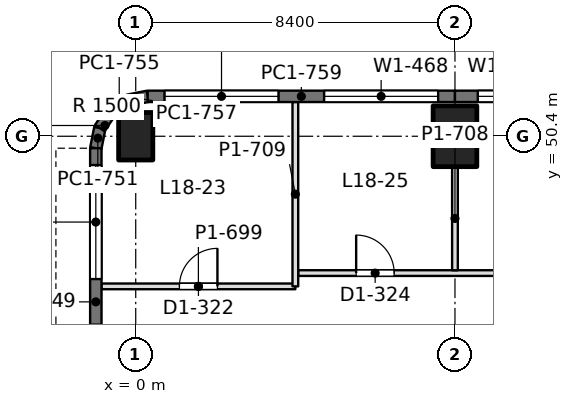
"""IFC4 building model, lengths in metres.
Left out: names, types, materials, properties, quantities, classifications, styles, units other than length and angle.
Written with IfcOpenShell. Run it as: python <this file> out.ifc"""

import sys

from ifc_helpers import new_model, si_unit, direction, frame, frame_2d, origin, origin_2d, place, context, subcontext, project, spatial, rectangle, extrude, element, fill, save


model = new_model("IFC4")
c1 = context("Model", 3, precision=1e-05, world=origin(), true_north=direction((0.0, 1.0)))
c2 = subcontext(c1, "Body", "Model", "MODEL_VIEW")
j1 = project(units=[si_unit("LENGTHUNIT", "METRE"), si_unit("PLANEANGLEUNIT", "RADIAN")], contexts=[c1])
p1 = place(None, origin())
s1 = spatial("IfcSite", under=j1, at=p1, CompositionType="ELEMENT")
p2 = place(p1, origin())
s2 = spatial("IfcBuilding", under=s1, at=p2, CompositionType="ELEMENT")
p3 = place(p2, frame((0.0, 0.0, 81.9)))
s3 = spatial("IfcBuildingStorey", under=s2, at=p3, CompositionType="ELEMENT", Elevation=81.9)
p4 = place(p3, frame((0.0, 50.4, 0.0), z_axis=(0.0, 0.0, 1.0), x_axis=(1.0, 0.0, 0.0)))
e1 = element("IfcColumn", 1, at=p4, inside=s3, PredefinedType="COLUMN", context=c2, shape_type="SweptSolid", body=[
    extrude(rectangle(XDim=0.9, YDim=1.25, at=origin_2d()), origin(), (0.0, 0.0, 1.0), 4.5),
])
p5 = place(p3, frame((8.4, 50.4, 0.0), z_axis=(0.0, 0.0, 1.0), x_axis=(1.0, 0.0, 0.0)))
e2 = element("IfcColumn", 2, at=p5, inside=s3, PredefinedType="COLUMN", context=c2, shape_type="SweptSolid", body=[
    extrude(rectangle(XDim=1.15, YDim=1.6, at=origin_2d()), origin(), (0.0, 0.0, 1.0), 4.5),
])
p6 = place(p3, frame((-1.05, 42.0, 0.0), z_axis=(0.0, 0.0, 1.0), x_axis=(0.0, 1.0, 0.0)))
e3 = element("IfcWall", 3, at=p6, inside=s3, PredefinedType="SOLIDWALL", context=c2, shape_type="SweptSolid", body=[
    extrude(rectangle(XDim=8.085, YDim=0.3, at=frame_2d((4.042, 0.0))), origin(), (0.0, 0.0, 1.0), 4.34),
])
p7 = place(p6, frame((0.443, 0.0, 0.9)))
e4 = element("IfcOpeningElement", 4, at=p7, cuts=e3, PredefinedType="OPENING", context=c2, shape_type="SweptSolid", body=[
    extrude(rectangle(XDim=3.0, YDim=1.9, at=frame_2d((1.5, 0.95))), frame((0.0, 0.16, 0.0), z_axis=(0.0, -1.0, 0.0), x_axis=(1.0, 0.0, 0.0)), (0.0, 0.0, 1.0), 0.32),
])
p8 = place(p6, frame((4.643, 0.0, 0.9)))
e5 = element("IfcOpeningElement", 5, at=p8, cuts=e3, PredefinedType="OPENING", context=c2, shape_type="SweptSolid", body=[
    extrude(rectangle(XDim=3.0, YDim=1.9, at=frame_2d((1.5, 0.95))), frame((0.0, 0.16, 0.0), z_axis=(0.0, -1.0, 0.0), x_axis=(1.0, 0.0, 0.0)), (0.0, 0.0, 1.0), 0.32),
])
p9 = place(p3, frame((-1.05, 50.085, 0.0), z_axis=(0.0, 0.0, 1.0), x_axis=(0.195073962632, 0.980788534345, 0.0)))
e6 = element("IfcWall", 6, at=p9, inside=s3, PredefinedType="SOLIDWALL", context=c2, shape_type="SweptSolid", body=[
    extrude(rectangle(XDim=0.541, YDim=0.3, at=frame_2d((0.271, 0.0))), origin(), (0.0, 0.0, 1.0), 4.34),
])
for number, where, z_axis, x_axis in (
    (7, (-0.945, 50.615, 0.0), (0.0, 0.0, 1.0), (0.556, 0.831, 0.0)),
    (8, (-0.653, 51.052, 0.0), (0.0, 0.0, 1.0), (0.831, 0.556, 0.0)),
):
    element("IfcWall", number, at=place(p3, frame(where, z_axis=z_axis, x_axis=x_axis)), inside=s3, PredefinedType="SOLIDWALL", context=c2, shape_type="SweptSolid", body=[
        extrude(rectangle(XDim=0.526, YDim=0.3, at=frame_2d((0.263, 0.0))), origin(), (0.0, 0.0, 1.0), 4.34),
    ])
p10 = place(p3, frame((-0.216, 51.344, 0.0), z_axis=(0.0, 0.0, 1.0), x_axis=(0.980788534345, 0.195073962632, 0.0)))
e9 = element("IfcWall", 9, at=p10, inside=s3, PredefinedType="SOLIDWALL", context=c2, shape_type="SweptSolid", body=[
    extrude(rectangle(XDim=0.541, YDim=0.3, at=frame_2d((0.271, 0.0))), origin(), (0.0, 0.0, 1.0), 4.34),
])
p11 = place(p3, frame((0.315, 51.45, 0.0), z_axis=(0.0, 0.0, 1.0), x_axis=(1.0, 0.0, 0.0)))
e10 = element("IfcWall", 10, at=p11, inside=s3, PredefinedType="SOLIDWALL", context=c2, shape_type="SweptSolid", body=[
    extrude(rectangle(XDim=8.085, YDim=0.3, at=frame_2d((4.042, 0.0))), origin(), (0.0, 0.0, 1.0), 4.34),
])
p12 = place(p11, frame((0.443, 0.0, 0.9)))
e11 = element("IfcOpeningElement", 11, at=p12, cuts=e10, PredefinedType="OPENING", context=c2, shape_type="SweptSolid", body=[
    extrude(rectangle(XDim=3.0, YDim=1.9, at=frame_2d((1.5, 0.95))), frame((0.0, 0.16, 0.0), z_axis=(0.0, -1.0, 0.0), x_axis=(1.0, 0.0, 0.0)), (0.0, 0.0, 1.0), 0.32),
])
p13 = place(p11, frame((4.643, 0.0, 0.9)))
e12 = element("IfcOpeningElement", 12, at=p13, cuts=e10, PredefinedType="OPENING", context=c2, shape_type="SweptSolid", body=[
    extrude(rectangle(XDim=3.0, YDim=1.9, at=frame_2d((1.5, 0.95))), frame((0.0, 0.16, 0.0), z_axis=(0.0, -1.0, 0.0), x_axis=(1.0, 0.0, 0.0)), (0.0, 0.0, 1.0), 0.32),
])
p14 = place(p3, frame((8.4, 51.45, 0.0), z_axis=(0.0, 0.0, 1.0), x_axis=(1.0, 0.0, 0.0)))
e13 = element("IfcWall", 13, at=p14, inside=s3, PredefinedType="SOLIDWALL", context=c2, shape_type="SweptSolid", body=[
    extrude(rectangle(XDim=8.4, YDim=0.3, at=frame_2d((4.2, 0.0))), origin(), (0.0, 0.0, 1.0), 4.34),
])
p15 = place(p14, frame((0.6, 0.0, 0.9)))
e14 = element("IfcOpeningElement", 14, at=p15, cuts=e13, PredefinedType="OPENING", context=c2, shape_type="SweptSolid", body=[
    extrude(rectangle(XDim=3.0, YDim=1.9, at=frame_2d((1.5, 0.95))), frame((0.0, 0.16, 0.0), z_axis=(0.0, -1.0, 0.0), x_axis=(1.0, 0.0, 0.0)), (0.0, 0.0, 1.0), 0.32),
])
p16 = place(p14, frame((4.8, 0.0, 0.9)))
e15 = element("IfcOpeningElement", 15, at=p16, cuts=e13, PredefinedType="OPENING", context=c2, shape_type="SweptSolid", body=[
    extrude(rectangle(XDim=3.0, YDim=1.9, at=frame_2d((1.5, 0.95))), frame((0.0, 0.16, 0.0), z_axis=(0.0, -1.0, 0.0), x_axis=(1.0, 0.0, 0.0)), (0.0, 0.0, 1.0), 0.32),
])
p17 = place(p3, frame((-0.902, 46.45, 0.0), z_axis=(0.0, 0.0, 1.0), x_axis=(1.0, 0.0, 0.0)))
e16 = element("IfcWall", 16, at=p17, inside=s3, PredefinedType="PARTITIONING", context=c2, shape_type="SweptSolid", body=[
    extrude(rectangle(XDim=5.102, YDim=0.15, at=frame_2d((2.551, 0.0))), origin(), (0.0, 0.0, 1.0), 3.84),
])
p18 = place(p17, frame((2.052, 0.0, 0.0)))
e17 = element("IfcOpeningElement", 17, at=p18, cuts=e16, PredefinedType="OPENING", context=c2, shape_type="SweptSolid", body=[
    extrude(rectangle(XDim=1.0, YDim=2.2, at=frame_2d((0.5, 1.1))), frame((0.0, 0.085, 0.0), z_axis=(0.0, -1.0, 0.0), x_axis=(1.0, 0.0, 0.0)), (0.0, 0.0, 1.0), 0.17),
])
p19 = place(p3, frame((4.274, 46.8, 0.0), z_axis=(0.0, 0.0, 1.0), x_axis=(1.0, 0.0, 0.0)))
e18 = element("IfcWall", 18, at=p19, inside=s3, PredefinedType="PARTITIONING", context=c2, shape_type="SweptSolid", body=[
    extrude(rectangle(XDim=12.452, YDim=0.15, at=frame_2d((6.226, 0.0))), origin(), (0.0, 0.0, 1.0), 3.74),
])
p20 = place(p19, frame((1.526, 0.0, 0.0)))
e19 = element("IfcOpeningElement", 19, at=p20, cuts=e18, PredefinedType="OPENING", context=c2, shape_type="SweptSolid", body=[
    extrude(rectangle(XDim=1.0, YDim=2.2, at=frame_2d((0.5, 1.1))), frame((0.0, 0.085, 0.0), z_axis=(0.0, -1.0, 0.0), x_axis=(1.0, 0.0, 0.0)), (0.0, 0.0, 1.0), 0.17),
])
p21 = place(p19, frame((5.726, 0.0, 0.0)))
e20 = element("IfcOpeningElement", 20, at=p21, cuts=e18, PredefinedType="OPENING", context=c2, shape_type="SweptSolid", body=[
    extrude(rectangle(XDim=1.0, YDim=2.2, at=frame_2d((0.5, 1.1))), frame((0.0, 0.085, 0.0), z_axis=(0.0, -1.0, 0.0), x_axis=(1.0, 0.0, 0.0)), (0.0, 0.0, 1.0), 0.17),
])
p22 = place(p19, frame((9.926, 0.0, 0.0)))
e21 = element("IfcOpeningElement", 21, at=p22, cuts=e18, PredefinedType="OPENING", context=c2, shape_type="SweptSolid", body=[
    extrude(rectangle(XDim=1.0, YDim=2.2, at=frame_2d((0.5, 1.1))), frame((0.0, 0.085, 0.0), z_axis=(0.0, -1.0, 0.0), x_axis=(1.0, 0.0, 0.0)), (0.0, 0.0, 1.0), 0.17),
])
p23 = place(p3, frame((4.2, 46.45, 0.0), z_axis=(0.0, 0.0, 1.0), x_axis=(0.0, 1.0, 0.0)))
e22 = element("IfcWall", 22, at=p23, inside=s3, PredefinedType="PARTITIONING", context=c2, shape_type="SweptSolid", body=[
    extrude(rectangle(XDim=4.852, YDim=0.15, at=frame_2d((2.426, 0.0))), origin(), (0.0, 0.0, 1.0), 3.84),
])
p24 = place(p3, frame((8.4, 46.874, 0.0), z_axis=(0.0, 0.0, 1.0), x_axis=(0.0, 1.0, 0.0)))
e23 = element("IfcWall", 23, at=p24, inside=s3, PredefinedType="PARTITIONING", context=c2, shape_type="SweptSolid", body=[
    extrude(rectangle(XDim=2.727, YDim=0.15, at=frame_2d((1.364, 0.0))), origin(), (0.0, 0.0, 1.0), 3.74),
])
p25 = place(p8, origin())
e24 = element("IfcWindow", 24, at=p25, inside=s3, PartitioningType="SINGLE_PANEL", PredefinedType="WINDOW", context=c2, shape_type="SweptSolid", body=[
    extrude(rectangle(XDim=3.0, YDim=1.9, at=frame_2d((1.5, 0.95))), frame((0.0, 0.03, 0.0), z_axis=(0.0, -1.0, 0.0), x_axis=(1.0, 0.0, 0.0)), (0.0, 0.0, 1.0), 0.06),
])
fill(e5, e24)
p26 = place(p12, origin())
e25 = element("IfcWindow", 25, at=p26, inside=s3, PartitioningType="SINGLE_PANEL", PredefinedType="WINDOW", context=c2, shape_type="SweptSolid", body=[
    extrude(rectangle(XDim=3.0, YDim=1.9, at=frame_2d((1.5, 0.95))), frame((0.0, 0.03, 0.0), z_axis=(0.0, -1.0, 0.0), x_axis=(1.0, 0.0, 0.0)), (0.0, 0.0, 1.0), 0.06),
])
fill(e11, e25)
p27 = place(p13, origin())
e26 = element("IfcWindow", 26, at=p27, inside=s3, PartitioningType="SINGLE_PANEL", PredefinedType="WINDOW", context=c2, shape_type="SweptSolid", body=[
    extrude(rectangle(XDim=3.0, YDim=1.9, at=frame_2d((1.5, 0.95))), frame((0.0, 0.03, 0.0), z_axis=(0.0, -1.0, 0.0), x_axis=(1.0, 0.0, 0.0)), (0.0, 0.0, 1.0), 0.06),
])
fill(e12, e26)
p28 = place(p15, origin())
e27 = element("IfcWindow", 27, at=p28, inside=s3, PartitioningType="SINGLE_PANEL", PredefinedType="WINDOW", context=c2, shape_type="SweptSolid", body=[
    extrude(rectangle(XDim=3.0, YDim=1.9, at=frame_2d((1.5, 0.95))), frame((0.0, 0.03, 0.0), z_axis=(0.0, -1.0, 0.0), x_axis=(1.0, 0.0, 0.0)), (0.0, 0.0, 1.0), 0.06),
])
fill(e14, e27)
p29 = place(p18, origin())
e28 = element("IfcDoor", 28, at=p29, inside=s3, OperationType="SINGLE_SWING_RIGHT", PredefinedType="DOOR", context=c2, shape_type="SweptSolid", body=[
    extrude(rectangle(XDim=1.0, YDim=2.2, at=frame_2d((0.5, 1.1))), frame((0.0, 0.025, 0.0), z_axis=(0.0, -1.0, 0.0), x_axis=(1.0, 0.0, 0.0)), (0.0, 0.0, 1.0), 0.05),
])
fill(e17, e28)
p30 = place(p20, origin())
e29 = element("IfcDoor", 29, at=p30, inside=s3, OperationType="SINGLE_SWING_LEFT", PredefinedType="DOOR", context=c2, shape_type="SweptSolid", body=[
    extrude(rectangle(XDim=1.0, YDim=2.2, at=frame_2d((0.5, 1.1))), frame((0.0, 0.025, 0.0), z_axis=(0.0, -1.0, 0.0), x_axis=(1.0, 0.0, 0.0)), (0.0, 0.0, 1.0), 0.05),
])
fill(e19, e29)
save(model, sys.argv[1])
